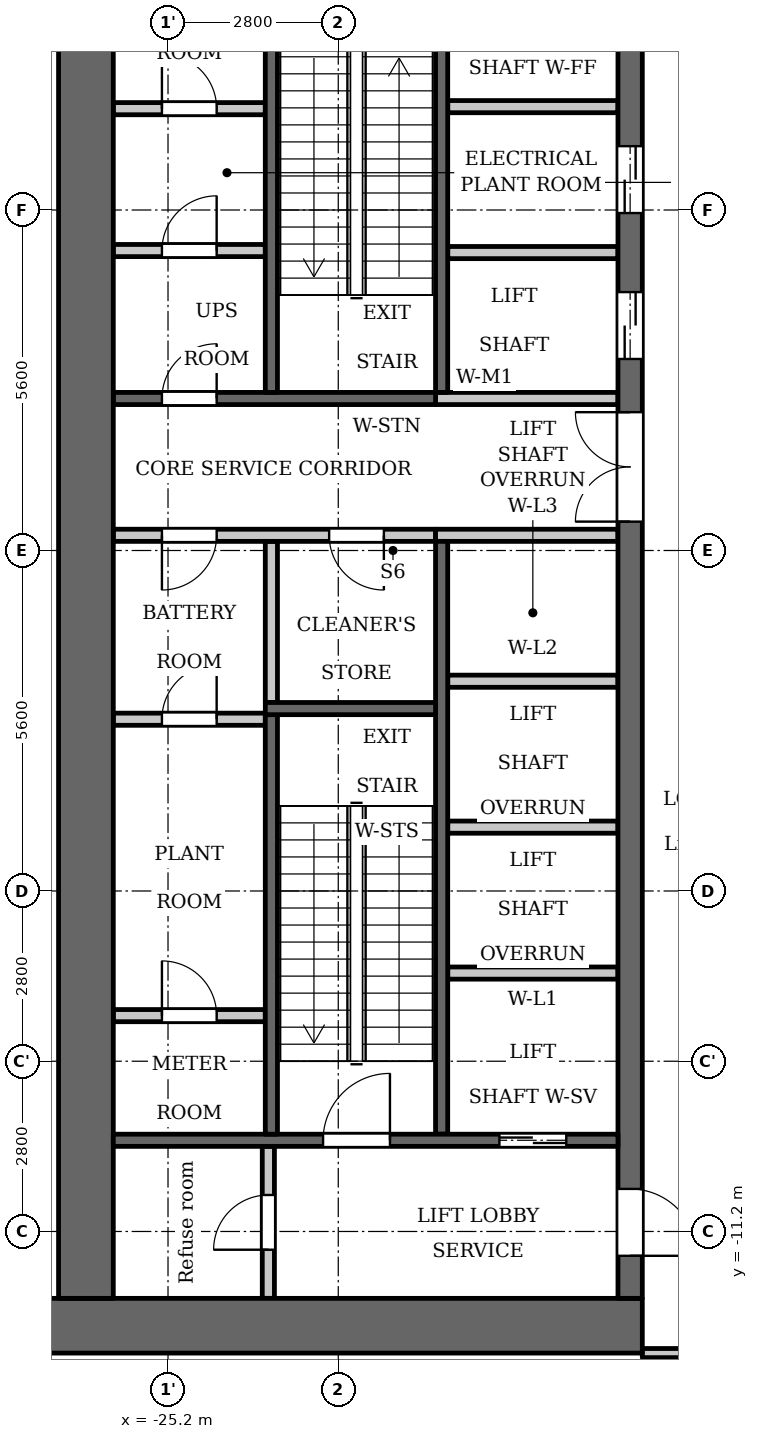
"""IFC4 building model, lengths in metres.
Left out: names, types, materials, properties, quantities, classifications, styles, units other than length and angle.
Written with IfcOpenShell. Run it as: python <this file> out.ifc"""

import sys

from ifc_helpers import new_model, si_unit, direction, frame, frame_2d, origin, place, context, subcontext, project, spatial, rectangle, extrude, element, fill, save


model = new_model("IFC4")
c1 = context("Model", 3, precision=1e-05, world=origin(), true_north=direction((0.0, 1.0)))
c2 = subcontext(c1, "Body", "Model", "MODEL_VIEW")
j1 = project(units=[si_unit("LENGTHUNIT", "METRE"), si_unit("PLANEANGLEUNIT", "RADIAN")], contexts=[c1])
p1 = place(None, origin())
s1 = spatial("IfcSite", under=j1, at=p1, CompositionType="ELEMENT")
p2 = place(p1, origin())
s2 = spatial("IfcBuilding", under=s1, at=p2, CompositionType="ELEMENT")
p3 = place(p2, frame((0.0, 0.0, 130.7)))
s3 = spatial("IfcBuildingStorey", under=s2, at=p3, CompositionType="ELEMENT", Elevation=130.7)
p4 = place(p3, frame((-23.5, -2.5, 0.0), z_axis=(0.0, 0.0, 1.0), x_axis=(0.0, 1.0, 0.0)))
e1 = element("IfcWall", 1, at=p4, inside=s3, PredefinedType="PARTITIONING", context=c2, shape_type="SweptSolid", body=[
    extrude(rectangle(XDim=2.65, YDim=0.2, at=frame_2d((1.325, 0.0))), origin(), (0.0, 0.0, 1.0), 5.1),
])
p5 = place(p3, frame((-20.7, 2.6, 0.0), z_axis=(0.0, 0.0, 1.0), x_axis=(0.0, 1.0, 0.0)))
e2 = element("IfcWall", 2, at=p5, inside=s3, PredefinedType="SHEAR", context=c2, shape_type="SweptSolid", body=[
    extrude(rectangle(XDim=7.0, YDim=0.2, at=frame_2d((3.5, 0.0))), origin(), (0.0, 0.0, 1.0), 5.1),
])
p6 = place(p3, frame((-20.7, -9.6, 0.0), z_axis=(0.0, 0.0, 1.0), x_axis=(0.0, 1.0, 0.0)))
e3 = element("IfcWall", 3, at=p6, inside=s3, PredefinedType="SHEAR", context=c2, shape_type="SweptSolid", body=[
    extrude(rectangle(XDim=9.75, YDim=0.2, at=frame_2d((4.875, 0.0))), origin(), (0.0, 0.0, 1.0), 5.1),
])
p7 = place(p3, frame((-20.8, 2.5, 0.0), z_axis=(0.0, 0.0, 1.0), x_axis=(-1.0, 0.0, 0.0)))
e4 = element("IfcWall", 4, at=p7, inside=s3, PredefinedType="SHEAR", context=c2, shape_type="SweptSolid", body=[
    extrude(rectangle(XDim=5.3, YDim=0.2, at=frame_2d((2.65, 0.0))), origin(), (0.0, 0.0, 1.0), 5.1),
])
p8 = place(p7, frame((3.6, 0.0, 0.0)))
e5 = element("IfcOpeningElement", 5, at=p8, cuts=e4, PredefinedType="OPENING", context=c2, shape_type="SweptSolid", body=[
    extrude(rectangle(XDim=0.9, YDim=2.1, at=frame_2d((0.45, 1.05))), frame((0.0, 0.11, 0.0), z_axis=(0.0, -1.0, 0.0), x_axis=(1.0, 0.0, 0.0)), (0.0, 0.0, 1.0), 0.22),
])
p9 = place(p3, frame((-20.8, 0.25, 0.0), z_axis=(0.0, 0.0, 1.0), x_axis=(-1.0, 0.0, 0.0)))
e6 = element("IfcWall", 6, at=p9, inside=s3, PredefinedType="PARTITIONING", context=c2, shape_type="SweptSolid", body=[
    extrude(rectangle(XDim=5.3, YDim=0.2, at=frame_2d((2.65, 0.0))), origin(), (0.0, 0.0, 1.0), 5.1),
])
p10 = place(p9, frame((0.85, 0.0, 0.0)))
e7 = element("IfcOpeningElement", 7, at=p10, cuts=e6, PredefinedType="OPENING", context=c2, shape_type="SweptSolid", body=[
    extrude(rectangle(XDim=0.9, YDim=2.1, at=frame_2d((0.45, 1.05))), frame((0.0, 0.11, 0.0), z_axis=(0.0, -1.0, 0.0), x_axis=(1.0, 0.0, 0.0)), (0.0, 0.0, 1.0), 0.22),
])
p11 = place(p9, frame((3.6, 0.0, 0.0)))
e8 = element("IfcOpeningElement", 8, at=p11, cuts=e6, PredefinedType="OPENING", context=c2, shape_type="SweptSolid", body=[
    extrude(rectangle(XDim=0.9, YDim=2.1, at=frame_2d((0.45, 1.05))), frame((0.0, 0.11, 0.0), z_axis=(0.0, -1.0, 0.0), x_axis=(1.0, 0.0, 0.0)), (0.0, 0.0, 1.0), 0.22),
])
p12 = place(p3, frame((-17.4, -12.75, 0.0), z_axis=(0.0, 0.0, 1.0), x_axis=(-1.0, 0.0, 0.0)))
e9 = element("IfcWall", 9, at=p12, inside=s3, PredefinedType="SHEAR", context=c2, shape_type="SweptSolid", body=[
    extrude(rectangle(XDim=10.4, YDim=0.9, at=frame_2d((5.2, 0.0))), origin(), (0.0, 0.0, 1.0), 5.1),
])
p13 = place(p3, frame((-17.6, -12.3, 0.0), z_axis=(0.0, 0.0, 1.0), x_axis=(0.0, 1.0, 0.0)))
e10 = element("IfcWall", 10, at=p13, inside=s3, PredefinedType="SHEAR", context=c2, shape_type="SweptSolid", body=[
    extrude(rectangle(XDim=24.6, YDim=0.4, at=frame_2d((12.3, 0.0))), origin(), (0.0, 0.0, 1.0), 5.1),
])
p14 = place(p13, frame((15.45, 0.0, 0.0)))
e11 = element("IfcOpeningElement", 11, at=p14, cuts=e10, PredefinedType="OPENING", context=c2, shape_type="SweptSolid", body=[
    extrude(rectangle(XDim=1.1, YDim=2.1, at=frame_2d((0.55, 1.05))), frame((0.0, 0.21, 0.0), z_axis=(0.0, -1.0, 0.0), x_axis=(1.0, 0.0, 0.0)), (0.0, 0.0, 1.0), 0.42),
])
p15 = place(p13, frame((17.85, 0.0, 0.0)))
e12 = element("IfcOpeningElement", 12, at=p15, cuts=e10, PredefinedType="OPENING", context=c2, shape_type="SweptSolid", body=[
    extrude(rectangle(XDim=1.1, YDim=2.1, at=frame_2d((0.55, 1.05))), frame((0.0, 0.21, 0.0), z_axis=(0.0, -1.0, 0.0), x_axis=(1.0, 0.0, 0.0)), (0.0, 0.0, 1.0), 0.42),
])
p16 = place(p13, frame((22.8, 0.0, 0.0)))
e13 = element("IfcOpeningElement", 13, at=p16, cuts=e10, PredefinedType="OPENING", context=c2, shape_type="SweptSolid", body=[
    extrude(rectangle(XDim=1.1, YDim=2.1, at=frame_2d((0.55, 1.05))), frame((0.0, 0.21, 0.0), z_axis=(0.0, -1.0, 0.0), x_axis=(1.0, 0.0, 0.0)), (0.0, 0.0, 1.0), 0.42),
])
p17 = place(p13, frame((0.7, 0.0, 0.0)))
e14 = element("IfcOpeningElement", 14, at=p17, cuts=e10, PredefinedType="OPENING", context=c2, shape_type="SweptSolid", body=[
    extrude(rectangle(XDim=1.1, YDim=2.1, at=frame_2d((0.55, 1.05))), frame((0.0, 0.21, 0.0), z_axis=(0.0, -1.0, 0.0), x_axis=(1.0, 0.0, 0.0)), (0.0, 0.0, 1.0), 0.42),
])
p18 = place(p13, frame((12.775, 0.0, 0.0)))
e15 = element("IfcOpeningElement", 15, at=p18, cuts=e10, PredefinedType="OPENING", context=c2, shape_type="SweptSolid", body=[
    extrude(rectangle(XDim=1.8, YDim=2.1, at=frame_2d((0.9, 1.05))), frame((0.0, 0.21, 0.0), z_axis=(0.0, -1.0, 0.0), x_axis=(1.0, 0.0, 0.0)), (0.0, 0.0, 1.0), 0.42),
])
p19 = place(p3, frame((-26.55, -12.3, 0.0), z_axis=(0.0, 0.0, 1.0), x_axis=(0.0, 1.0, 0.0)))
e16 = element("IfcWall", 16, at=p19, inside=s3, PredefinedType="SHEAR", context=c2, shape_type="SweptSolid", body=[
    extrude(rectangle(XDim=24.6, YDim=0.9, at=frame_2d((12.3, 0.0))), origin(), (0.0, 0.0, 1.0), 5.1),
])
p20 = place(p3, frame((-23.55, -12.3, 0.0), z_axis=(0.0, 0.0, 1.0), x_axis=(0.0, 1.0, 0.0)))
e17 = element("IfcWall", 17, at=p20, inside=s3, PredefinedType="PARTITIONING", context=c2, shape_type="SweptSolid", body=[
    extrude(rectangle(XDim=2.5, YDim=0.2, at=frame_2d((1.25, 0.0))), origin(), (0.0, 0.0, 1.0), 5.1),
])
p21 = place(p20, frame((0.8, 0.0, 0.0)))
e18 = element("IfcOpeningElement", 18, at=p21, cuts=e17, PredefinedType="OPENING", context=c2, shape_type="SweptSolid", body=[
    extrude(rectangle(XDim=0.9, YDim=2.1, at=frame_2d((0.45, 1.05))), frame((0.0, 0.11, 0.0), z_axis=(0.0, -1.0, 0.0), x_axis=(1.0, 0.0, 0.0)), (0.0, 0.0, 1.0), 0.22),
])
p22 = place(p3, frame((-23.6, -7.65, 0.0), z_axis=(0.0, 0.0, 1.0), x_axis=(-1.0, 0.0, 0.0)))
e19 = element("IfcWall", 19, at=p22, inside=s3, PredefinedType="PARTITIONING", context=c2, shape_type="SweptSolid", body=[
    extrude(rectangle(XDim=2.5, YDim=0.2, at=frame_2d((1.25, 0.0))), origin(), (0.0, 0.0, 1.0), 5.1),
])
p23 = place(p22, frame((0.8, 0.0, 0.0)))
e20 = element("IfcOpeningElement", 20, at=p23, cuts=e19, PredefinedType="OPENING", context=c2, shape_type="SweptSolid", body=[
    extrude(rectangle(XDim=0.9, YDim=2.1, at=frame_2d((0.45, 1.05))), frame((0.0, 0.11, 0.0), z_axis=(0.0, -1.0, 0.0), x_axis=(1.0, 0.0, 0.0)), (0.0, 0.0, 1.0), 0.22),
])
p24 = place(p3, frame((-23.6, -2.775, 0.0), z_axis=(0.0, 0.0, 1.0), x_axis=(-1.0, 0.0, 0.0)))
e21 = element("IfcWall", 21, at=p24, inside=s3, PredefinedType="PARTITIONING", context=c2, shape_type="SweptSolid", body=[
    extrude(rectangle(XDim=2.5, YDim=0.2, at=frame_2d((1.25, 0.0))), origin(), (0.0, 0.0, 1.0), 5.1),
])
p25 = place(p24, frame((0.8, 0.0, 0.0)))
e22 = element("IfcOpeningElement", 22, at=p25, cuts=e21, PredefinedType="OPENING", context=c2, shape_type="SweptSolid", body=[
    extrude(rectangle(XDim=0.9, YDim=2.1, at=frame_2d((0.45, 1.05))), frame((0.0, 0.11, 0.0), z_axis=(0.0, -1.0, 0.0), x_axis=(1.0, 0.0, 0.0)), (0.0, 0.0, 1.0), 0.22),
])
p26 = place(p3, frame((-23.6, 4.933, 0.0), z_axis=(0.0, 0.0, 1.0), x_axis=(-1.0, 0.0, 0.0)))
e23 = element("IfcWall", 23, at=p26, inside=s3, PredefinedType="PARTITIONING", context=c2, shape_type="SweptSolid", body=[
    extrude(rectangle(XDim=2.5, YDim=0.2, at=frame_2d((1.25, 0.0))), origin(), (0.0, 0.0, 1.0), 5.1),
])
p27 = place(p26, frame((0.8, 0.0, 0.0)))
e24 = element("IfcOpeningElement", 24, at=p27, cuts=e23, PredefinedType="OPENING", context=c2, shape_type="SweptSolid", body=[
    extrude(rectangle(XDim=0.9, YDim=2.1, at=frame_2d((0.45, 1.05))), frame((0.0, 0.11, 0.0), z_axis=(0.0, -1.0, 0.0), x_axis=(1.0, 0.0, 0.0)), (0.0, 0.0, 1.0), 0.22),
])
p28 = place(p3, frame((-23.6, 7.267, 0.0), z_axis=(0.0, 0.0, 1.0), x_axis=(-1.0, 0.0, 0.0)))
e25 = element("IfcWall", 25, at=p28, inside=s3, PredefinedType="PARTITIONING", context=c2, shape_type="SweptSolid", body=[
    extrude(rectangle(XDim=2.5, YDim=0.2, at=frame_2d((1.25, 0.0))), origin(), (0.0, 0.0, 1.0), 5.1),
])
p29 = place(p28, frame((0.8, 0.0, 0.0)))
e26 = element("IfcOpeningElement", 26, at=p29, cuts=e25, PredefinedType="OPENING", context=c2, shape_type="SweptSolid", body=[
    extrude(rectangle(XDim=0.9, YDim=2.1, at=frame_2d((0.45, 1.05))), frame((0.0, 0.11, 0.0), z_axis=(0.0, -1.0, 0.0), x_axis=(1.0, 0.0, 0.0)), (0.0, 0.0, 1.0), 0.22),
])
p30 = place(p3, frame((-17.8, -9.7, 0.0), z_axis=(0.0, 0.0, 1.0), x_axis=(-1.0, 0.0, 0.0)))
e27 = element("IfcWall", 27, at=p30, inside=s3, PredefinedType="SHEAR", context=c2, shape_type="SweptSolid", body=[
    extrude(rectangle(XDim=8.3, YDim=0.2, at=frame_2d((4.15, 0.0))), origin(), (0.0, 0.0, 1.0), 5.1),
])
p31 = place(p30, frame((0.85, 0.0, 0.0)))
e28 = element("IfcOpeningElement", 28, at=p31, cuts=e27, PredefinedType="OPENING", context=c2, shape_type="SweptSolid", body=[
    extrude(rectangle(XDim=1.1, YDim=2.1, at=frame_2d((0.55, 1.05))), frame((0.0, 0.11, 0.0), z_axis=(0.0, -1.0, 0.0), x_axis=(1.0, 0.0, 0.0)), (0.0, 0.0, 1.0), 0.22),
])
p32 = place(p30, frame((3.75, 0.0, 0.0)))
e29 = element("IfcOpeningElement", 29, at=p32, cuts=e27, PredefinedType="OPENING", context=c2, shape_type="SweptSolid", body=[
    extrude(rectangle(XDim=1.1, YDim=2.1, at=frame_2d((0.55, 1.05))), frame((0.0, 0.11, 0.0), z_axis=(0.0, -1.0, 0.0), x_axis=(1.0, 0.0, 0.0)), (0.0, 0.0, 1.0), 0.22),
])
for number, where, z_axis, x_axis in (
    (30, (-17.8, -6.95, 0.0), (0.0, 0.0, 1.0), (-1.0, 0.0, 0.0)),
    (31, (-17.8, -4.55, 0.0), (0.0, 0.0, 1.0), (-1.0, 0.0, 0.0)),
    (32, (-17.8, -2.15, 0.0), (0.0, 0.0, 1.0), (-1.0, 0.0, 0.0)),
):
    element("IfcWall", number, at=place(p3, frame(where, z_axis=z_axis, x_axis=x_axis)), inside=s3, PredefinedType="PARTITIONING", context=c2, shape_type="SweptSolid", body=[
        extrude(rectangle(XDim=2.8, YDim=0.2, at=frame_2d((1.4, 0.0))), origin(), (0.0, 0.0, 1.0), 5.1),
    ])
for number, where, z_axis, x_axis in (
    (33, (-17.8, 0.25, 0.0), (0.0, 0.0, 1.0), (-1.0, 0.0, 0.0)),
    (34, (-17.8, 2.5, 0.0), (0.0, 0.0, 1.0), (-1.0, 0.0, 0.0)),
):
    element("IfcWall", number, at=place(p3, frame(where, z_axis=z_axis, x_axis=x_axis)), inside=s3, PredefinedType="PARTITIONING", context=c2, shape_type="SweptSolid", body=[
        extrude(rectangle(XDim=3.0, YDim=0.2, at=frame_2d((1.5, 0.0))), origin(), (0.0, 0.0, 1.0), 5.1),
    ])
for number, where, z_axis, x_axis in (
    (35, (-17.8, 4.9, 0.0), (0.0, 0.0, 1.0), (-1.0, 0.0, 0.0)),
    (36, (-17.8, 7.3, 0.0), (0.0, 0.0, 1.0), (-1.0, 0.0, 0.0)),
):
    element("IfcWall", number, at=place(p3, frame(where, z_axis=z_axis, x_axis=x_axis)), inside=s3, PredefinedType="PARTITIONING", context=c2, shape_type="SweptSolid", body=[
        extrude(rectangle(XDim=2.8, YDim=0.2, at=frame_2d((1.4, 0.0))), origin(), (0.0, 0.0, 1.0), 5.1),
    ])
p33 = place(p3, frame((-23.5, 2.6, 0.0), z_axis=(0.0, 0.0, 1.0), x_axis=(0.0, 1.0, 0.0)))
e37 = element("IfcWall", 37, at=p33, inside=s3, PredefinedType="SHEAR", context=c2, shape_type="SweptSolid", body=[
    extrude(rectangle(XDim=7.0, YDim=0.2, at=frame_2d((3.5, 0.0))), origin(), (0.0, 0.0, 1.0), 5.1),
])
p34 = place(p3, frame((-23.5, -9.6, 0.0), z_axis=(0.0, 0.0, 1.0), x_axis=(0.0, 1.0, 0.0)))
e38 = element("IfcWall", 38, at=p34, inside=s3, PredefinedType="SHEAR", context=c2, shape_type="SweptSolid", body=[
    extrude(rectangle(XDim=6.9, YDim=0.2, at=frame_2d((3.45, 0.0))), origin(), (0.0, 0.0, 1.0), 5.1),
])
p35 = place(p3, frame((-20.8, -2.6, 0.0), z_axis=(0.0, 0.0, 1.0), x_axis=(-1.0, 0.0, 0.0)))
e39 = element("IfcWall", 39, at=p35, inside=s3, PredefinedType="SHEAR", context=c2, shape_type="SweptSolid", body=[
    extrude(rectangle(XDim=2.8, YDim=0.2, at=frame_2d((1.4, 0.0))), origin(), (0.0, 0.0, 1.0), 5.1),
])
p36 = place(p3, frame((-17.4, -13.2, 0.0), z_axis=(0.0, 0.0, 1.0), x_axis=(1.0, 0.0, 0.0)))
e40 = element("IfcWall", 40, at=p36, inside=s3, PredefinedType="PARTITIONING", context=c2, shape_type="SweptSolid", body=[
    extrude(rectangle(XDim=5.88, YDim=0.15, at=frame_2d((2.94, 0.0))), origin(), (0.0, 0.0, 1.0), 5.1),
])
p37 = place(p36, frame((0.65, 0.0, 0.0)))
e41 = element("IfcOpeningElement", 41, at=p37, cuts=e40, PredefinedType="OPENING", context=c2, shape_type="SweptSolid", body=[
    extrude(rectangle(XDim=1.0, YDim=2.1, at=frame_2d((0.5, 1.05))), frame((0.0, 0.085, 0.0), z_axis=(0.0, -1.0, 0.0), x_axis=(1.0, 0.0, 0.0)), (0.0, 0.0, 1.0), 0.17),
])
p38 = place(p36, frame((4.81, 0.0, 0.0)))
e42 = element("IfcOpeningElement", 42, at=p38, cuts=e40, PredefinedType="OPENING", context=c2, shape_type="SweptSolid", body=[
    extrude(rectangle(XDim=0.9, YDim=2.1, at=frame_2d((0.45, 1.05))), frame((0.0, 0.085, 0.0), z_axis=(0.0, -1.0, 0.0), x_axis=(1.0, 0.0, 0.0)), (0.0, 0.0, 1.0), 0.17),
])
p39 = place(p36, frame((3.0, 0.0, 0.0)))
e43 = element("IfcOpeningElement", 43, at=p39, cuts=e40, PredefinedType="OPENING", context=c2, shape_type="SweptSolid", body=[
    extrude(rectangle(XDim=0.9, YDim=2.1, at=frame_2d((0.45, 1.05))), frame((0.0, 0.085, 0.0), z_axis=(0.0, -1.0, 0.0), x_axis=(1.0, 0.0, 0.0)), (0.0, 0.0, 1.0), 0.17),
])
p40 = place(p31, origin())
e44 = element("IfcDoor", 44, at=p40, inside=s3, OperationType="DOUBLE_DOOR_SLIDING", PredefinedType="DOOR", context=c2, shape_type="SweptSolid", body=[
    extrude(rectangle(XDim=1.1, YDim=2.1, at=frame_2d((0.55, 1.05))), frame((0.0, 0.025, 0.0), z_axis=(0.0, -1.0, 0.0), x_axis=(1.0, 0.0, 0.0)), (0.0, 0.0, 1.0), 0.05),
])
fill(e28, e44)
p41 = place(p14, origin())
e45 = element("IfcDoor", 45, at=p41, inside=s3, OperationType="DOUBLE_DOOR_SLIDING", PredefinedType="DOOR", context=c2, shape_type="SweptSolid", body=[
    extrude(rectangle(XDim=1.1, YDim=2.1, at=frame_2d((0.55, 1.05))), frame((0.0, 0.025, 0.0), z_axis=(0.0, -1.0, 0.0), x_axis=(1.0, 0.0, 0.0)), (0.0, 0.0, 1.0), 0.05),
])
fill(e11, e45)
p42 = place(p15, origin())
e46 = element("IfcDoor", 46, at=p42, inside=s3, OperationType="DOUBLE_DOOR_SLIDING", PredefinedType="DOOR", context=c2, shape_type="SweptSolid", body=[
    extrude(rectangle(XDim=1.1, YDim=2.1, at=frame_2d((0.55, 1.05))), frame((0.0, 0.025, 0.0), z_axis=(0.0, -1.0, 0.0), x_axis=(1.0, 0.0, 0.0)), (0.0, 0.0, 1.0), 0.05),
])
fill(e12, e46)
p43 = place(p17, origin())
e47 = element("IfcDoor", 47, at=p43, inside=s3, OperationType="SINGLE_SWING_LEFT", PredefinedType="DOOR", context=c2, shape_type="SweptSolid", body=[
    extrude(rectangle(XDim=1.1, YDim=2.1, at=frame_2d((0.55, 1.05))), frame((0.0, 0.025, 0.0), z_axis=(0.0, -1.0, 0.0), x_axis=(1.0, 0.0, 0.0)), (0.0, 0.0, 1.0), 0.05),
])
fill(e14, e47)
p44 = place(p21, origin())
e48 = element("IfcDoor", 48, at=p44, inside=s3, OperationType="SINGLE_SWING_RIGHT", PredefinedType="DOOR", context=c2, shape_type="SweptSolid", body=[
    extrude(rectangle(XDim=0.9, YDim=2.1, at=frame_2d((0.45, 1.05))), frame((0.0, 0.025, 0.0), z_axis=(0.0, -1.0, 0.0), x_axis=(1.0, 0.0, 0.0)), (0.0, 0.0, 1.0), 0.05),
])
fill(e18, e48)
p45 = place(p32, origin())
e49 = element("IfcDoor", 49, at=p45, inside=s3, OperationType="SINGLE_SWING_LEFT", PredefinedType="DOOR", context=c2, shape_type="SweptSolid", body=[
    extrude(rectangle(XDim=1.1, YDim=2.1, at=frame_2d((0.55, 1.05))), frame((0.0, 0.025, 0.0), z_axis=(0.0, -1.0, 0.0), x_axis=(1.0, 0.0, 0.0)), (0.0, 0.0, 1.0), 0.05),
])
fill(e29, e49)
p46 = place(p18, origin())
e50 = element("IfcDoor", 50, at=p46, inside=s3, OperationType="DOUBLE_DOOR_SINGLE_SWING", PredefinedType="DOOR", context=c2, shape_type="SweptSolid", body=[
    extrude(rectangle(XDim=1.8, YDim=2.1, at=frame_2d((0.9, 1.05))), frame((0.0, 0.025, 0.0), z_axis=(0.0, -1.0, 0.0), x_axis=(1.0, 0.0, 0.0)), (0.0, 0.0, 1.0), 0.05),
])
fill(e15, e50)
p47 = place(p10, origin())
e51 = element("IfcDoor", 51, at=p47, inside=s3, OperationType="SINGLE_SWING_RIGHT", PredefinedType="DOOR", context=c2, shape_type="SweptSolid", body=[
    extrude(rectangle(XDim=0.9, YDim=2.1, at=frame_2d((0.45, 1.05))), frame((0.0, 0.025, 0.0), z_axis=(0.0, -1.0, 0.0), x_axis=(1.0, 0.0, 0.0)), (0.0, 0.0, 1.0), 0.05),
])
fill(e7, e51)
p48 = place(p23, origin())
e52 = element("IfcDoor", 52, at=p48, inside=s3, OperationType="SINGLE_SWING_RIGHT", PredefinedType="DOOR", context=c2, shape_type="SweptSolid", body=[
    extrude(rectangle(XDim=0.9, YDim=2.1, at=frame_2d((0.45, 1.05))), frame((0.0, 0.025, 0.0), z_axis=(0.0, -1.0, 0.0), x_axis=(1.0, 0.0, 0.0)), (0.0, 0.0, 1.0), 0.05),
])
fill(e20, e52)
p49 = place(p25, origin())
e53 = element("IfcDoor", 53, at=p49, inside=s3, OperationType="SINGLE_SWING_LEFT", PredefinedType="DOOR", context=c2, shape_type="SweptSolid", body=[
    extrude(rectangle(XDim=0.9, YDim=2.1, at=frame_2d((0.45, 1.05))), frame((0.0, 0.025, 0.0), z_axis=(0.0, -1.0, 0.0), x_axis=(1.0, 0.0, 0.0)), (0.0, 0.0, 1.0), 0.05),
])
fill(e22, e53)
p50 = place(p11, origin())
e54 = element("IfcDoor", 54, at=p50, inside=s3, OperationType="SINGLE_SWING_LEFT", PredefinedType="DOOR", context=c2, shape_type="SweptSolid", body=[
    extrude(rectangle(XDim=0.9, YDim=2.1, at=frame_2d((0.45, 1.05))), frame((0.0, 0.025, 0.0), z_axis=(0.0, -1.0, 0.0), x_axis=(1.0, 0.0, 0.0)), (0.0, 0.0, 1.0), 0.05),
])
fill(e8, e54)
p51 = place(p27, origin())
e55 = element("IfcDoor", 55, at=p51, inside=s3, OperationType="SINGLE_SWING_LEFT", PredefinedType="DOOR", context=c2, shape_type="SweptSolid", body=[
    extrude(rectangle(XDim=0.9, YDim=2.1, at=frame_2d((0.45, 1.05))), frame((0.0, 0.025, 0.0), z_axis=(0.0, -1.0, 0.0), x_axis=(1.0, 0.0, 0.0)), (0.0, 0.0, 1.0), 0.05),
])
fill(e24, e55)
p52 = place(p29, origin())
e56 = element("IfcDoor", 56, at=p52, inside=s3, OperationType="SINGLE_SWING_RIGHT", PredefinedType="DOOR", context=c2, shape_type="SweptSolid", body=[
    extrude(rectangle(XDim=0.9, YDim=2.1, at=frame_2d((0.45, 1.05))), frame((0.0, 0.025, 0.0), z_axis=(0.0, -1.0, 0.0), x_axis=(1.0, 0.0, 0.0)), (0.0, 0.0, 1.0), 0.05),
])
fill(e26, e56)
p53 = place(p8, origin())
e57 = element("IfcDoor", 57, at=p53, inside=s3, OperationType="SINGLE_SWING_LEFT", PredefinedType="DOOR", context=c2, shape_type="SweptSolid", body=[
    extrude(rectangle(XDim=0.9, YDim=2.1, at=frame_2d((0.45, 1.05))), frame((0.0, 0.025, 0.0), z_axis=(0.0, -1.0, 0.0), x_axis=(1.0, 0.0, 0.0)), (0.0, 0.0, 1.0), 0.05),
])
fill(e5, e57)
save(model, sys.argv[1])
